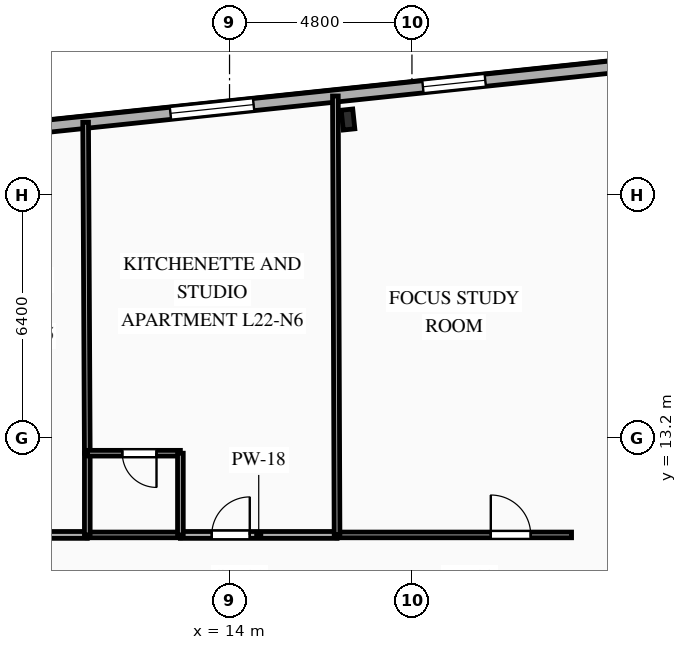
"""IFC4 building model, lengths in metres.
Left out: names, types, materials, properties, quantities, classifications, styles, units other than length and angle.
Written with IfcOpenShell. Run it as: python <this file> out.ifc"""

import sys

from ifc_helpers import new_model, si_unit, direction, frame, frame_2d, origin, origin_2d, place, context, subcontext, project, spatial, rectangle, i_section, extrude, element, fill, save


model = new_model("IFC4")
c1 = context("Model", 3, precision=1e-05, world=origin(), true_north=direction((0.0, 1.0)))
c2 = subcontext(c1, "Body", "Model", "MODEL_VIEW")
j1 = project(units=[si_unit("LENGTHUNIT", "METRE"), si_unit("PLANEANGLEUNIT", "RADIAN")], contexts=[c1])
p1 = place(None, origin())
s1 = spatial("IfcSite", under=j1, at=p1, CompositionType="ELEMENT")
p2 = place(p1, origin())
s2 = spatial("IfcBuilding", under=s1, at=p2, CompositionType="ELEMENT")
p3 = place(p2, frame((0.0, 0.0, 82.35)))
s3 = spatial("IfcBuildingStorey", under=s2, at=p3, CompositionType="ELEMENT", Elevation=82.35)
p4 = place(p3, frame((17.117, 21.58, 0.0), z_axis=(0.0, 0.0, 1.0), x_axis=(0.994521895368, 0.104528463268, 0.0)))
e1 = element("IfcColumn", 1, at=p4, inside=s3, PredefinedType="COLUMN", context=c2, shape_type="SweptSolid", body=[
    extrude(i_section(OverallWidth=0.306, OverallDepth=0.524, WebThickness=0.021, FlangeThickness=0.04, FilletRadius=0.027, at=origin_2d()), origin(), (0.0, 0.0, 1.0), 3.35),
])
p5 = place(p3, frame((-27.107, 17.586, 0.0), z_axis=(0.0, 0.0, 1.0), x_axis=(0.994521628355, 0.104531003701, 0.0)))
e2 = element("IfcWall", 2, at=p5, inside=s3, PredefinedType="SOLIDWALL", context=c2, shape_type="SweptSolid", body=[
    extrude(rectangle(XDim=53.8, YDim=0.32, at=frame_2d((26.9, 0.0))), origin(), (0.0, 0.0, 1.0), 3.045),
])
p6 = place(p5, frame((6.781, 0.0, 0.85)))
e3 = element("IfcOpeningElement", 3, at=p6, cuts=e2, PredefinedType="OPENING", context=c2, shape_type="SweptSolid", body=[
    extrude(rectangle(XDim=1.65, YDim=1.85, at=frame_2d((0.825, 0.925))), frame((0.0, 0.17, 0.0), z_axis=(0.0, -1.0, 0.0), x_axis=(1.0, 0.0, 0.0)), (0.0, 0.0, 1.0), 0.34),
])
p7 = place(p5, frame((14.862, 0.0, 0.85)))
e4 = element("IfcOpeningElement", 4, at=p7, cuts=e2, PredefinedType="OPENING", context=c2, shape_type="SweptSolid", body=[
    extrude(rectangle(XDim=1.5, YDim=1.85, at=frame_2d((0.75, 0.925))), frame((0.0, 0.17, 0.0), z_axis=(0.0, -1.0, 0.0), x_axis=(1.0, 0.0, 0.0)), (0.0, 0.0, 1.0), 0.34),
])
p8 = place(p5, frame((19.956, 0.0, 0.85)))
e5 = element("IfcOpeningElement", 5, at=p8, cuts=e2, PredefinedType="OPENING", context=c2, shape_type="SweptSolid", body=[
    extrude(rectangle(XDim=2.2, YDim=1.85, at=frame_2d((1.1, 0.925))), frame((0.0, 0.17, 0.0), z_axis=(0.0, -1.0, 0.0), x_axis=(1.0, 0.0, 0.0)), (0.0, 0.0, 1.0), 0.34),
])
p9 = place(p5, frame((26.561, 0.0, 0.85)))
e6 = element("IfcOpeningElement", 6, at=p9, cuts=e2, PredefinedType="OPENING", context=c2, shape_type="SweptSolid", body=[
    extrude(rectangle(XDim=2.2, YDim=1.85, at=frame_2d((1.1, 0.925))), frame((0.0, 0.17, 0.0), z_axis=(0.0, -1.0, 0.0), x_axis=(1.0, 0.0, 0.0)), (0.0, 0.0, 1.0), 0.34),
])
p10 = place(p5, frame((33.166, 0.0, 0.85)))
e7 = element("IfcOpeningElement", 7, at=p10, cuts=e2, PredefinedType="OPENING", context=c2, shape_type="SweptSolid", body=[
    extrude(rectangle(XDim=2.2, YDim=1.85, at=frame_2d((1.1, 0.925))), frame((0.0, 0.17, 0.0), z_axis=(0.0, -1.0, 0.0), x_axis=(1.0, 0.0, 0.0)), (0.0, 0.0, 1.0), 0.34),
])
p11 = place(p5, frame((39.771, 0.0, 0.85)))
e8 = element("IfcOpeningElement", 8, at=p11, cuts=e2, PredefinedType="OPENING", context=c2, shape_type="SweptSolid", body=[
    extrude(rectangle(XDim=2.2, YDim=1.85, at=frame_2d((1.1, 0.925))), frame((0.0, 0.17, 0.0), z_axis=(0.0, -1.0, 0.0), x_axis=(1.0, 0.0, 0.0)), (0.0, 0.0, 1.0), 0.34),
])
p12 = place(p5, frame((46.45, 0.0, 0.85)))
e9 = element("IfcOpeningElement", 9, at=p12, cuts=e2, PredefinedType="OPENING", context=c2, shape_type="SweptSolid", body=[
    extrude(rectangle(XDim=1.65, YDim=1.85, at=frame_2d((0.825, 0.925))), frame((0.0, 0.17, 0.0), z_axis=(0.0, -1.0, 0.0), x_axis=(1.0, 0.0, 0.0)), (0.0, 0.0, 1.0), 0.34),
])
p13 = place(p3, frame((6.136, 10.65, 0.0), z_axis=(0.0, 0.0, 1.0), x_axis=(1.0, 0.0, 0.0)))
e10 = element("IfcWall", 10, at=p13, inside=s3, PredefinedType="PARTITIONING", context=c2, shape_type="SweptSolid", body=[
    extrude(rectangle(XDim=4.121, YDim=0.18, at=frame_2d((2.061, 0.0))), origin(), (0.0, 0.0, 1.0), 3.045),
])
p14 = place(p13, frame((0.825, 0.0, 0.0)))
e11 = element("IfcOpeningElement", 11, at=p14, cuts=e10, PredefinedType="OPENING", context=c2, shape_type="SweptSolid", body=[
    extrude(rectangle(XDim=1.0, YDim=2.15, at=frame_2d((0.5, 1.075))), frame((0.0, 0.1, 0.0), z_axis=(0.0, -1.0, 0.0), x_axis=(1.0, 0.0, 0.0)), (0.0, 0.0, 1.0), 0.2),
])
p15 = place(p3, frame((12.707, 10.65, 0.0), z_axis=(0.0, 0.0, 1.0), x_axis=(1.0, 0.0, 0.0)))
e12 = element("IfcWall", 12, at=p15, inside=s3, PredefinedType="PARTITIONING", context=c2, shape_type="SweptSolid", body=[
    extrude(rectangle(XDim=4.122, YDim=0.18, at=frame_2d((2.061, 0.0))), origin(), (0.0, 0.0, 1.0), 3.045),
])
p16 = place(p15, frame((0.825, 0.0, 0.0)))
e13 = element("IfcOpeningElement", 13, at=p16, cuts=e12, PredefinedType="OPENING", context=c2, shape_type="SweptSolid", body=[
    extrude(rectangle(XDim=1.0, YDim=2.15, at=frame_2d((0.5, 1.075))), frame((0.0, 0.1, 0.0), z_axis=(0.0, -1.0, 0.0), x_axis=(1.0, 0.0, 0.0)), (0.0, 0.0, 1.0), 0.2),
])
p17 = place(p3, frame((10.257, 10.65, 0.0), z_axis=(0.0, 0.0, 1.0), x_axis=(1.0, 0.0, 0.0)))
e14 = element("IfcWall", 14, at=p17, inside=s3, PredefinedType="PLUMBINGWALL", context=c2, shape_type="SweptSolid", body=[
    extrude(rectangle(XDim=2.45, YDim=0.15, at=frame_2d((1.225, 0.0))), origin(), (0.0, 0.0, 1.0), 3.045),
])
p18 = place(p3, frame((16.829, 10.65, 0.0), z_axis=(0.0, 0.0, 1.0), x_axis=(1.0, 0.0, 0.0)))
e15 = element("IfcWall", 15, at=p18, inside=s3, PredefinedType="PARTITIONING", context=c2, shape_type="SweptSolid", body=[
    extrude(rectangle(XDim=6.171, YDim=0.15, at=frame_2d((3.085, 0.0))), origin(), (0.0, 0.0, 1.0), 3.045),
])
p19 = place(p18, frame((4.046, 0.0, 0.0)))
e16 = element("IfcOpeningElement", 16, at=p19, cuts=e15, PredefinedType="OPENING", context=c2, shape_type="SweptSolid", body=[
    extrude(rectangle(XDim=1.05, YDim=2.15, at=frame_2d((0.525, 1.075))), frame((0.0, 0.085, 0.0), z_axis=(0.0, -1.0, 0.0), x_axis=(1.0, 0.0, 0.0)), (0.0, 0.0, 1.0), 0.17),
])
p20 = place(p3, frame((10.213, 21.508, 0.0), z_axis=(0.0, 0.0, 1.0), x_axis=(0.005046334579, -0.999987267173, 0.0)))
e17 = element("IfcWall", 17, at=p20, inside=s3, PredefinedType="PARTITIONING", context=c2, shape_type="SweptSolid", body=[
    extrude(rectangle(XDim=8.708, YDim=0.15, at=frame_2d((4.354, 0.0))), origin(), (0.0, 0.0, 1.0), 3.045),
])
p21 = place(p3, frame((10.257, 12.8, 0.0), z_axis=(0.0, 0.0, 1.0), x_axis=(0.0, -1.0, 0.0)))
e18 = element("IfcWall", 18, at=p21, inside=s3, PredefinedType="PLUMBINGWALL", context=c2, shape_type="SweptSolid", body=[
    extrude(rectangle(XDim=2.15, YDim=0.15, at=frame_2d((1.075, 0.0))), origin(), (0.0, 0.0, 1.0), 3.045),
])
p22 = place(p3, frame((12.707, 12.8, 0.0), z_axis=(0.0, 0.0, 1.0), x_axis=(-1.0, 0.0, 0.0)))
e19 = element("IfcWall", 19, at=p22, inside=s3, PredefinedType="PLUMBINGWALL", context=c2, shape_type="SweptSolid", body=[
    extrude(rectangle(XDim=2.45, YDim=0.15, at=frame_2d((1.225, 0.0))), origin(), (0.0, 0.0, 1.0), 3.045),
])
p23 = place(p22, frame((0.629, 0.0, 0.0)))
e20 = element("IfcOpeningElement", 20, at=p23, cuts=e19, PredefinedType="OPENING", context=c2, shape_type="SweptSolid", body=[
    extrude(rectangle(XDim=0.9, YDim=2.1, at=frame_2d((0.45, 1.05))), frame((0.0, 0.085, 0.0), z_axis=(0.0, -1.0, 0.0), x_axis=(1.0, 0.0, 0.0)), (0.0, 0.0, 1.0), 0.17),
])
p24 = place(p3, frame((12.707, 10.65, 0.0), z_axis=(0.0, 0.0, 1.0), x_axis=(0.0, 1.0, 0.0)))
e21 = element("IfcWall", 21, at=p24, inside=s3, PredefinedType="PLUMBINGWALL", context=c2, shape_type="SweptSolid", body=[
    extrude(rectangle(XDim=2.15, YDim=0.15, at=frame_2d((1.075, 0.0))), origin(), (0.0, 0.0, 1.0), 3.045),
])
p25 = place(p3, frame((16.785, 22.199, 0.0), z_axis=(0.0, 0.0, 1.0), x_axis=(0.003805067053, -0.999992760706, 0.0)))
e22 = element("IfcWall", 22, at=p25, inside=s3, PredefinedType="PARTITIONING", context=c2, shape_type="SweptSolid", body=[
    extrude(rectangle(XDim=11.549, YDim=0.15, at=frame_2d((5.774, 0.0))), origin(), (0.0, 0.0, 1.0), 3.045),
])
p26 = place(p11, origin())
e23 = element("IfcWindow", 23, at=p26, inside=s3, PartitioningType="SINGLE_PANEL", PredefinedType="WINDOW", context=c2, shape_type="SweptSolid", body=[
    extrude(rectangle(XDim=2.2, YDim=1.85, at=frame_2d((1.1, 0.925))), frame((0.0, 0.03, 0.0), z_axis=(0.0, -1.0, 0.0), x_axis=(1.0, 0.0, 0.0)), (0.0, 0.0, 1.0), 0.06),
])
fill(e8, e23)
p27 = place(p12, origin())
e24 = element("IfcWindow", 24, at=p27, inside=s3, PartitioningType="SINGLE_PANEL", PredefinedType="WINDOW", context=c2, shape_type="SweptSolid", body=[
    extrude(rectangle(XDim=1.65, YDim=1.85, at=frame_2d((0.825, 0.925))), frame((0.0, 0.03, 0.0), z_axis=(0.0, -1.0, 0.0), x_axis=(1.0, 0.0, 0.0)), (0.0, 0.0, 1.0), 0.06),
])
fill(e9, e24)
p28 = place(p16, origin())
e25 = element("IfcDoor", 25, at=p28, inside=s3, OperationType="SINGLE_SWING_RIGHT", PredefinedType="DOOR", context=c2, shape_type="SweptSolid", body=[
    extrude(rectangle(XDim=1.0, YDim=2.15, at=frame_2d((0.5, 1.075))), frame((0.0, 0.025, 0.0), z_axis=(0.0, -1.0, 0.0), x_axis=(1.0, 0.0, 0.0)), (0.0, 0.0, 1.0), 0.05),
])
fill(e13, e25)
p29 = place(p19, origin())
e26 = element("IfcDoor", 26, at=p29, inside=s3, OperationType="SINGLE_SWING_LEFT", PredefinedType="DOOR", context=c2, shape_type="SweptSolid", body=[
    extrude(rectangle(XDim=1.05, YDim=2.15, at=frame_2d((0.525, 1.075))), frame((0.0, 0.025, 0.0), z_axis=(0.0, -1.0, 0.0), x_axis=(1.0, 0.0, 0.0)), (0.0, 0.0, 1.0), 0.05),
])
fill(e16, e26)
p30 = place(p23, origin())
e27 = element("IfcDoor", 27, at=p30, inside=s3, OperationType="SINGLE_SWING_LEFT", PredefinedType="DOOR", context=c2, shape_type="SweptSolid", body=[
    extrude(rectangle(XDim=0.9, YDim=2.1, at=frame_2d((0.45, 1.05))), frame((0.0, 0.025, 0.0), z_axis=(0.0, -1.0, 0.0), x_axis=(1.0, 0.0, 0.0)), (0.0, 0.0, 1.0), 0.05),
])
fill(e20, e27)
save(model, sys.argv[1])
